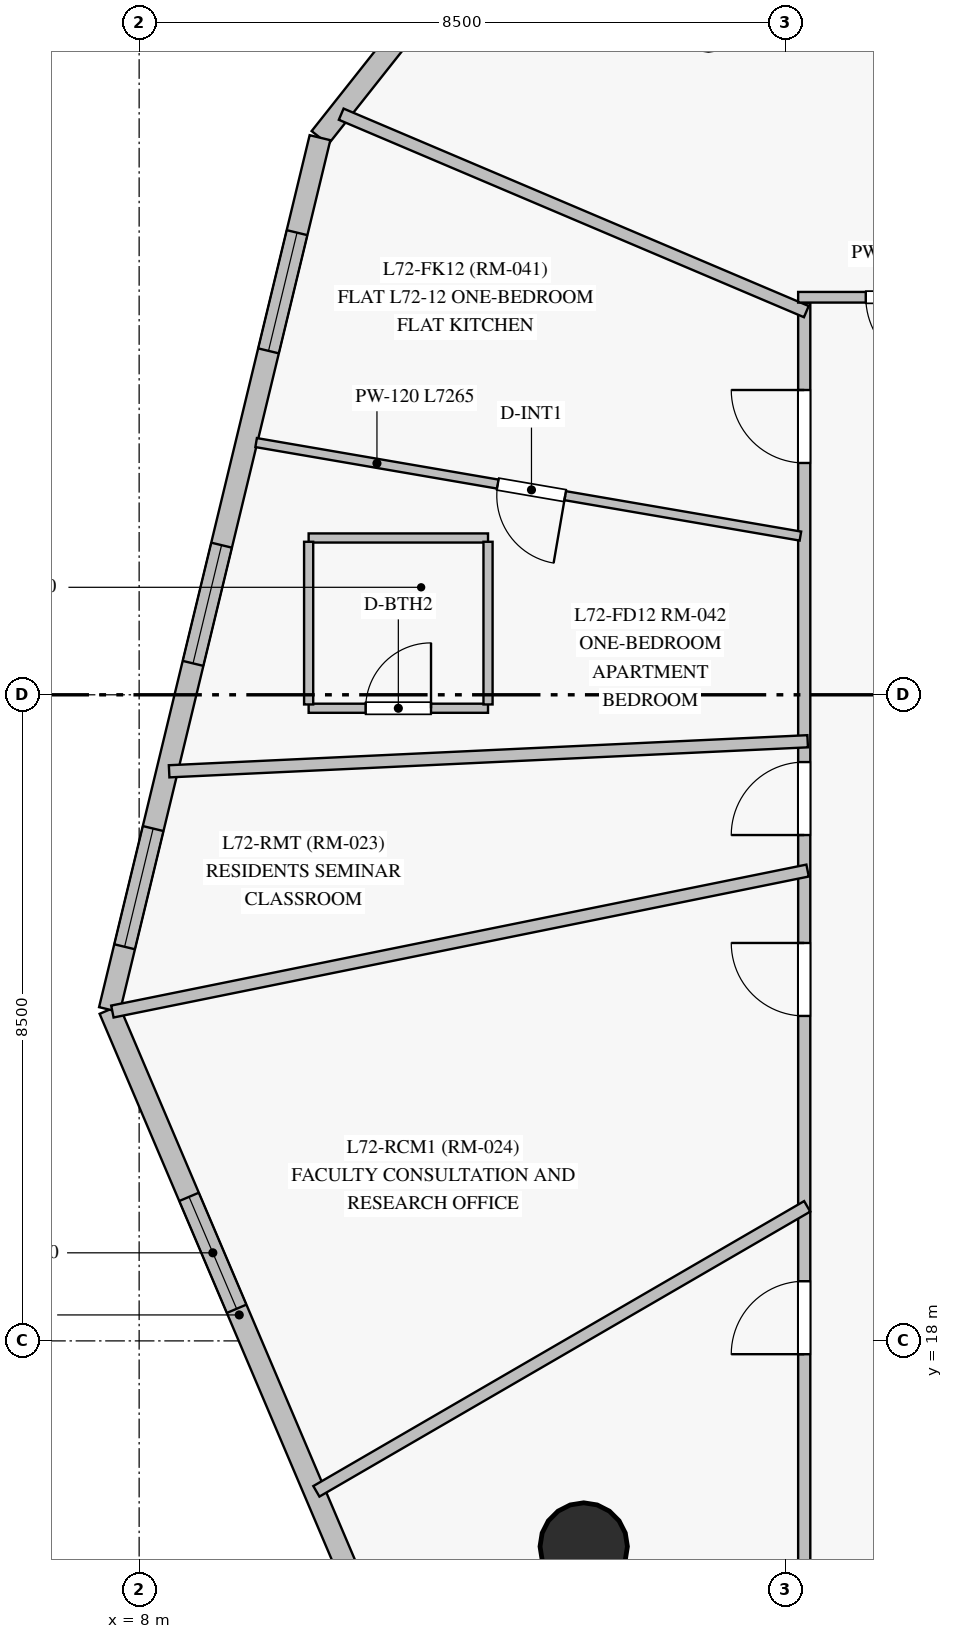
"""IFC4 building model, lengths in metres.
Left out: names, types, materials, properties, quantities, classifications, styles, units other than length and angle.
Written with IfcOpenShell. Run it as: python <this file> out.ifc"""

import sys

from ifc_helpers import new_model, si_unit, direction, frame, frame_2d, origin, origin_with_axes, origin_2d, place, context, subcontext, project, spatial, rectangle, circle, extrude, source, transform, mapped, element, fill, save


model = new_model("IFC4")
c1 = context("Model", 3, precision=1e-05, world=origin(), true_north=direction((0.0, 1.0)))
c2 = subcontext(c1, "Body", "Model", "MODEL_VIEW")
j1 = project(units=[si_unit("LENGTHUNIT", "METRE"), si_unit("PLANEANGLEUNIT", "RADIAN")], contexts=[c1])
p1 = place(None, origin())
s1 = spatial("IfcSite", under=j1, at=p1, CompositionType="ELEMENT")
p2 = place(p1, origin())
s2 = spatial("IfcBuilding", under=s1, at=p2, CompositionType="ELEMENT")
p3 = place(p2, frame((0.0, 0.0, 244.35)))
s3 = spatial("IfcBuildingStorey", under=s2, at=p3, CompositionType="ELEMENT", Elevation=244.35)
m1 = source(origin_with_axes(), c2, "Body", "SweptSolid", [
    extrude(circle(Radius=0.575, at=origin_2d()), origin(), (0.0, 0.0, 1.0), 3.05),
])
p4 = place(p3, frame((13.849, 15.295, 0.0), z_axis=(0.0, 0.0, 1.0), x_axis=(1.0, 0.0, 0.0)))
e1 = element("IfcColumn", 1, at=p4, inside=s3, PredefinedType="COLUMN", context=c2, shape_type="MappedRepresentation", body=[
    mapped(m1, transform((0.0, 0.0, 0.0), scale=1.0)),
])
p5 = place(p3, frame((7.609, 22.358, 0.0), z_axis=(0.0, 0.0, 1.0), x_axis=(0.391369236154, -0.920233731718, 0.0)))
e2 = element("IfcWall", 2, at=p5, inside=s3, PredefinedType="SOLIDWALL", context=c2, shape_type="SweptSolid", body=[
    extrude(rectangle(XDim=8.729, YDim=0.28, at=frame_2d((4.365, 0.0))), origin(), (0.0, 0.0, 1.0), 2.85),
])
p6 = place(p5, frame((2.677, 0.0, 0.85)))
e3 = element("IfcOpeningElement", 3, at=p6, cuts=e2, PredefinedType="OPENING", context=c2, shape_type="SweptSolid", body=[
    extrude(rectangle(XDim=1.6, YDim=1.6, at=frame_2d((0.8, 0.8))), frame((0.0, 0.15, 0.0), z_axis=(0.0, -1.0, 0.0), x_axis=(1.0, 0.0, 0.0)), (0.0, 0.0, 1.0), 0.3),
])
p7 = place(p3, frame((16.049, 40.994, 0.0), z_axis=(0.0, 0.0, 1.0), x_axis=(-0.620583849852, -0.784140092906, 0.0)))
e4 = element("IfcWall", 4, at=p7, inside=s3, PredefinedType="SOLIDWALL", context=c2, shape_type="SweptSolid", body=[
    extrude(rectangle(XDim=9.137, YDim=0.28, at=frame_2d((4.568, 0.0))), origin(), (0.0, 0.0, 1.0), 2.85),
])
p8 = place(p7, frame((1.583, 0.0, 0.85)))
e5 = element("IfcOpeningElement", 5, at=p8, cuts=e4, PredefinedType="OPENING", context=c2, shape_type="SweptSolid", body=[
    extrude(rectangle(XDim=1.6, YDim=1.6, at=frame_2d((0.8, 0.8))), frame((0.0, 0.15, 0.0), z_axis=(0.0, -1.0, 0.0), x_axis=(1.0, 0.0, 0.0)), (0.0, 0.0, 1.0), 0.3),
])
p9 = place(p7, frame((5.589, 0.0, 0.85)))
e6 = element("IfcOpeningElement", 6, at=p9, cuts=e4, PredefinedType="OPENING", context=c2, shape_type="SweptSolid", body=[
    extrude(rectangle(XDim=1.6, YDim=1.6, at=frame_2d((0.8, 0.8))), frame((0.0, 0.15, 0.0), z_axis=(0.0, -1.0, 0.0), x_axis=(1.0, 0.0, 0.0)), (0.0, 0.0, 1.0), 0.3),
])
p10 = place(p3, frame((10.379, 33.829, 0.0), z_axis=(0.0, 0.0, 1.0), x_axis=(-0.234744342627, -0.972057145236, 0.0)))
e7 = element("IfcWall", 7, at=p10, inside=s3, PredefinedType="SOLIDWALL", context=c2, shape_type="SweptSolid", body=[
    extrude(rectangle(XDim=11.801, YDim=0.28, at=frame_2d((5.901, 0.0))), origin(), (0.0, 0.0, 1.0), 2.85),
])
p11 = place(p10, frame((1.285, 0.0, 0.85)))
e8 = element("IfcOpeningElement", 8, at=p11, cuts=e7, PredefinedType="OPENING", context=c2, shape_type="SweptSolid", body=[
    extrude(rectangle(XDim=1.6, YDim=1.6, at=frame_2d((0.8, 0.8))), frame((0.0, 0.15, 0.0), z_axis=(0.0, -1.0, 0.0), x_axis=(1.0, 0.0, 0.0)), (0.0, 0.0, 1.0), 0.3),
])
p12 = place(p10, frame((5.515, 0.0, 0.85)))
e9 = element("IfcOpeningElement", 9, at=p12, cuts=e7, PredefinedType="OPENING", context=c2, shape_type="SweptSolid", body=[
    extrude(rectangle(XDim=1.6, YDim=1.6, at=frame_2d((0.8, 0.8))), frame((0.0, 0.15, 0.0), z_axis=(0.0, -1.0, 0.0), x_axis=(1.0, 0.0, 0.0)), (0.0, 0.0, 1.0), 0.3),
])
p13 = place(p10, frame((9.35, 0.0, 0.85)))
e10 = element("IfcOpeningElement", 10, at=p13, cuts=e7, PredefinedType="OPENING", context=c2, shape_type="SweptSolid", body=[
    extrude(rectangle(XDim=1.6, YDim=1.6, at=frame_2d((0.8, 0.8))), frame((0.0, 0.15, 0.0), z_axis=(0.0, -1.0, 0.0), x_axis=(1.0, 0.0, 0.0)), (0.0, 0.0, 1.0), 0.3),
])
p14 = place(p3, frame((16.75, 13.85, 0.0), z_axis=(0.0, 0.0, 1.0), x_axis=(0.0, 1.0, 0.0)))
e11 = element("IfcWall", 11, at=p14, inside=s3, PredefinedType="PARTITIONING", context=c2, shape_type="SweptSolid", body=[
    extrude(rectangle(XDim=17.8, YDim=0.16, at=frame_2d((8.9, 0.0))), origin(), (0.0, 0.0, 1.0), 2.45),
])
p15 = place(p14, frame((15.7, 0.0, 0.0)))
e12 = element("IfcOpeningElement", 12, at=p15, cuts=e11, PredefinedType="OPENING", context=c2, shape_type="SweptSolid", body=[
    extrude(rectangle(XDim=0.96, YDim=2.15, at=frame_2d((0.48, 1.075))), frame((0.0, 0.09, 0.0), z_axis=(0.0, -1.0, 0.0), x_axis=(1.0, 0.0, 0.0)), (0.0, 0.0, 1.0), 0.18),
])
p16 = place(p14, frame((10.805, 0.0, 0.0)))
e13 = element("IfcOpeningElement", 13, at=p16, cuts=e11, PredefinedType="OPENING", context=c2, shape_type="SweptSolid", body=[
    extrude(rectangle(XDim=0.96, YDim=2.15, at=frame_2d((0.48, 1.075))), frame((0.0, 0.09, 0.0), z_axis=(0.0, -1.0, 0.0), x_axis=(1.0, 0.0, 0.0)), (0.0, 0.0, 1.0), 0.18),
])
p17 = place(p14, frame((8.425, 0.0, 0.0)))
e14 = element("IfcOpeningElement", 14, at=p17, cuts=e11, PredefinedType="OPENING", context=c2, shape_type="SweptSolid", body=[
    extrude(rectangle(XDim=0.96, YDim=2.15, at=frame_2d((0.48, 1.075))), frame((0.0, 0.09, 0.0), z_axis=(0.0, -1.0, 0.0), x_axis=(1.0, 0.0, 0.0)), (0.0, 0.0, 1.0), 0.18),
])
p18 = place(p14, frame((3.975, 0.0, 0.0)))
e15 = element("IfcOpeningElement", 15, at=p18, cuts=e11, PredefinedType="OPENING", context=c2, shape_type="SweptSolid", body=[
    extrude(rectangle(XDim=0.96, YDim=2.15, at=frame_2d((0.48, 1.075))), frame((0.0, 0.09, 0.0), z_axis=(0.0, -1.0, 0.0), x_axis=(1.0, 0.0, 0.0)), (0.0, 0.0, 1.0), 0.18),
])
p19 = place(p3, frame((16.794, 24.188, 0.0), z_axis=(0.0, 0.0, 1.0), x_axis=(-0.980057031383, -0.198716419144, 0.0)))
e16 = element("IfcWall", 16, at=p19, inside=s3, PredefinedType="PARTITIONING", context=c2, shape_type="SweptSolid", body=[
    extrude(rectangle(XDim=9.332, YDim=0.16, at=frame_2d((4.666, 0.0))), origin(), (0.0, 0.0, 1.0), 2.85),
])
p20 = place(p3, frame((8.395, 25.493, 0.0), z_axis=(0.0, 0.0, 1.0), x_axis=(0.998893542663, 0.047028612837, 0.0)))
e17 = element("IfcWall", 17, at=p20, inside=s3, PredefinedType="PARTITIONING", context=c2, shape_type="SweptSolid", body=[
    extrude(rectangle(XDim=8.41, YDim=0.16, at=frame_2d((4.205, 0.0))), origin(), (0.0, 0.0, 1.0), 2.85),
])
p21 = place(p3, frame((16.789, 19.77, 0.0), z_axis=(0.0, 0.0, 1.0), x_axis=(-0.864795816659, -0.502123685449, 0.0)))
e18 = element("IfcWall", 18, at=p21, inside=s3, PredefinedType="PARTITIONING", context=c2, shape_type="SweptSolid", body=[
    extrude(rectangle(XDim=7.467, YDim=0.16, at=frame_2d((3.733, 0.0))), origin(), (0.0, 0.0, 1.0), 2.85),
])
p22 = place(p3, frame((16.7, 28.588, 0.0), z_axis=(0.0, 0.0, 1.0), x_axis=(-0.98556527765, 0.16929584605, 0.0)))
e19 = element("IfcWall", 19, at=p22, inside=s3, PredefinedType="PARTITIONING", context=c2, shape_type="SweptSolid", body=[
    extrude(rectangle(XDim=7.265, YDim=0.12, at=frame_2d((3.633, 0.0))), origin(), (0.0, 0.0, 1.0), 2.85),
])
p23 = place(p22, frame((3.14, 0.0, 0.0)))
e20 = element("IfcOpeningElement", 20, at=p23, cuts=e19, PredefinedType="OPENING", context=c2, shape_type="SweptSolid", body=[
    extrude(rectangle(XDim=0.9, YDim=2.1, at=frame_2d((0.45, 1.05))), frame((0.0, 0.07, 0.0), z_axis=(0.0, -1.0, 0.0), x_axis=(1.0, 0.0, 0.0)), (0.0, 0.0, 1.0), 0.14),
])
p24 = place(p3, frame((16.778, 31.541, 0.0), z_axis=(0.0, 0.0, 1.0), x_axis=(-0.920499732199, 0.390743193188, 0.0)))
e21 = element("IfcWall", 21, at=p24, inside=s3, PredefinedType="PARTITIONING", context=c2, shape_type="SweptSolid", body=[
    extrude(rectangle(XDim=6.647, YDim=0.16, at=frame_2d((3.324, 0.0))), origin(), (0.0, 0.0, 1.0), 2.85),
])
p25 = place(p3, frame((19.42, 31.73, 0.0), z_axis=(0.0, 0.0, 1.0), x_axis=(-1.0, 0.0, 0.0)))
e22 = element("IfcWall", 22, at=p25, inside=s3, PredefinedType="PARTITIONING", context=c2, shape_type="SweptSolid", body=[
    extrude(rectangle(XDim=2.75, YDim=0.14, at=frame_2d((1.375, 0.0))), origin(), (0.0, 0.0, 1.0), 2.85),
])
p26 = place(p25, frame((0.9, 0.0, 0.0)))
e23 = element("IfcOpeningElement", 23, at=p26, cuts=e22, PredefinedType="OPENING", context=c2, shape_type="SweptSolid", body=[
    extrude(rectangle(XDim=0.96, YDim=2.15, at=frame_2d((0.48, 1.075))), frame((0.0, 0.08, 0.0), z_axis=(0.0, -1.0, 0.0), x_axis=(1.0, 0.0, 0.0)), (0.0, 0.0, 1.0), 0.16),
])
p27 = place(p3, frame((10.23, 26.323, 0.0), z_axis=(0.0, 0.0, 1.0), x_axis=(1.0, 0.0, 0.0)))
e24 = element("IfcWall", 24, at=p27, inside=s3, PredefinedType="PARTITIONING", context=c2, shape_type="SweptSolid", body=[
    extrude(rectangle(XDim=2.36, YDim=0.12, at=frame_2d((1.18, 0.0))), origin(), (0.0, 0.0, 1.0), 2.85),
])
p28 = place(p27, frame((0.75, 0.0, 0.0)))
e25 = element("IfcOpeningElement", 25, at=p28, cuts=e24, PredefinedType="OPENING", context=c2, shape_type="SweptSolid", body=[
    extrude(rectangle(XDim=0.86, YDim=2.04, at=frame_2d((0.43, 1.02))), frame((0.0, 0.07, 0.0), z_axis=(0.0, -1.0, 0.0), x_axis=(1.0, 0.0, 0.0)), (0.0, 0.0, 1.0), 0.14),
])
p29 = place(p3, frame((12.59, 28.563, 0.0), z_axis=(0.0, 0.0, 1.0), x_axis=(-1.0, 0.0, 0.0)))
e26 = element("IfcWall", 26, at=p29, inside=s3, PredefinedType="PARTITIONING", context=c2, shape_type="SweptSolid", body=[
    extrude(rectangle(XDim=2.36, YDim=0.12, at=frame_2d((1.18, 0.0))), origin(), (0.0, 0.0, 1.0), 2.85),
])
for number, where, z_axis, x_axis in (
    (27, (12.59, 26.373, 0.0), (0.0, 0.0, 1.0), (0.0, 1.0, 0.0)),
    (28, (10.23, 28.513, 0.0), (0.0, 0.0, 1.0), (0.0, -1.0, 0.0)),
):
    element("IfcWall", number, at=place(p3, frame(where, z_axis=z_axis, x_axis=x_axis)), inside=s3, PredefinedType="PARTITIONING", context=c2, shape_type="SweptSolid", body=[
        extrude(rectangle(XDim=2.14, YDim=0.12, at=frame_2d((1.07, 0.0))), origin(), (0.0, 0.0, 1.0), 2.85),
    ])
m2 = source(origin_with_axes(), c2, "Body", "SweptSolid", [
    extrude(rectangle(XDim=1.6, YDim=1.6, at=frame_2d((0.8, 0.8))), frame((0.0, 0.03, 0.0), z_axis=(0.0, -1.0, 0.0), x_axis=(1.0, 0.0, 0.0)), (0.0, 0.0, 1.0), 0.06),
])
p30 = place(p6, origin())
e29 = element("IfcWindow", 29, at=p30, inside=s3, PartitioningType="SINGLE_PANEL", PredefinedType="WINDOW", context=c2, shape_type="MappedRepresentation", body=[
    mapped(m2, transform((0.0, 0.0, 0.0), scale=1.0)),
])
fill(e3, e29)
p31 = place(p11, origin())
e30 = element("IfcWindow", 30, at=p31, inside=s3, PartitioningType="SINGLE_PANEL", PredefinedType="WINDOW", context=c2, shape_type="MappedRepresentation", body=[
    mapped(m2, transform((0.0, 0.0, 0.0), scale=1.0)),
])
fill(e8, e30)
p32 = place(p12, origin())
e31 = element("IfcWindow", 31, at=p32, inside=s3, PartitioningType="SINGLE_PANEL", PredefinedType="WINDOW", context=c2, shape_type="MappedRepresentation", body=[
    mapped(m2, transform((0.0, 0.0, 0.0), scale=1.0)),
])
fill(e9, e31)
p33 = place(p13, origin())
e32 = element("IfcWindow", 32, at=p33, inside=s3, PartitioningType="SINGLE_PANEL", PredefinedType="WINDOW", context=c2, shape_type="MappedRepresentation", body=[
    mapped(m2, transform((0.0, 0.0, 0.0), scale=1.0)),
])
fill(e10, e32)
m3 = source(origin_with_axes(), c2, "Body", "SweptSolid", [
    extrude(rectangle(XDim=0.96, YDim=2.15, at=frame_2d((0.48, 1.075))), frame((0.0, 0.025, 0.0), z_axis=(0.0, -1.0, 0.0), x_axis=(1.0, 0.0, 0.0)), (0.0, 0.0, 1.0), 0.05),
])
p34 = place(p26, origin())
e33 = element("IfcDoor", 33, at=p34, inside=s3, OperationType="SINGLE_SWING_LEFT", PredefinedType="DOOR", context=c2, shape_type="MappedRepresentation", body=[
    mapped(m3, transform((0.0, 0.0, 0.0), scale=1.0)),
])
fill(e23, e33)
m4 = source(origin_with_axes(), c2, "Body", "SweptSolid", [
    extrude(rectangle(XDim=0.86, YDim=2.04, at=frame_2d((0.43, 1.02))), frame((0.0, 0.025, 0.0), z_axis=(0.0, -1.0, 0.0), x_axis=(1.0, 0.0, 0.0)), (0.0, 0.0, 1.0), 0.05),
])
p35 = place(p28, origin())
e34 = element("IfcDoor", 34, at=p35, inside=s3, OperationType="SINGLE_SWING_RIGHT", PredefinedType="DOOR", context=c2, shape_type="MappedRepresentation", body=[
    mapped(m4, transform((0.0, 0.0, 0.0), scale=1.0)),
])
fill(e25, e34)
m5 = source(origin_with_axes(), c2, "Body", "SweptSolid", [
    extrude(rectangle(XDim=0.9, YDim=2.1, at=frame_2d((0.45, 1.05))), frame((0.0, 0.025, 0.0), z_axis=(0.0, -1.0, 0.0), x_axis=(1.0, 0.0, 0.0)), (0.0, 0.0, 1.0), 0.05),
])
p36 = place(p23, origin())
e35 = element("IfcDoor", 35, at=p36, inside=s3, OperationType="SINGLE_SWING_LEFT", PredefinedType="DOOR", context=c2, shape_type="MappedRepresentation", body=[
    mapped(m5, transform((0.0, 0.0, 0.0), scale=1.0)),
])
fill(e20, e35)
p37 = place(p15, origin())
e36 = element("IfcDoor", 36, at=p37, inside=s3, OperationType="SINGLE_SWING_RIGHT", PredefinedType="DOOR", context=c2, shape_type="MappedRepresentation", body=[
    mapped(m3, transform((0.0, 0.0, 0.0), scale=1.0)),
])
fill(e12, e36)
p38 = place(p16, origin())
e37 = element("IfcDoor", 37, at=p38, inside=s3, OperationType="SINGLE_SWING_LEFT", PredefinedType="DOOR", context=c2, shape_type="MappedRepresentation", body=[
    mapped(m3, transform((0.0, 0.0, 0.0), scale=1.0)),
])
fill(e13, e37)
p39 = place(p17, origin())
e38 = element("IfcDoor", 38, at=p39, inside=s3, OperationType="SINGLE_SWING_RIGHT", PredefinedType="DOOR", context=c2, shape_type="MappedRepresentation", body=[
    mapped(m3, transform((0.0, 0.0, 0.0), scale=1.0)),
])
fill(e14, e38)
p40 = place(p18, origin())
e39 = element("IfcDoor", 39, at=p40, inside=s3, OperationType="SINGLE_SWING_LEFT", PredefinedType="DOOR", context=c2, shape_type="MappedRepresentation", body=[
    mapped(m3, transform((0.0, 0.0, 0.0), scale=1.0)),
])
fill(e15, e39)
save(model, sys.argv[1])
